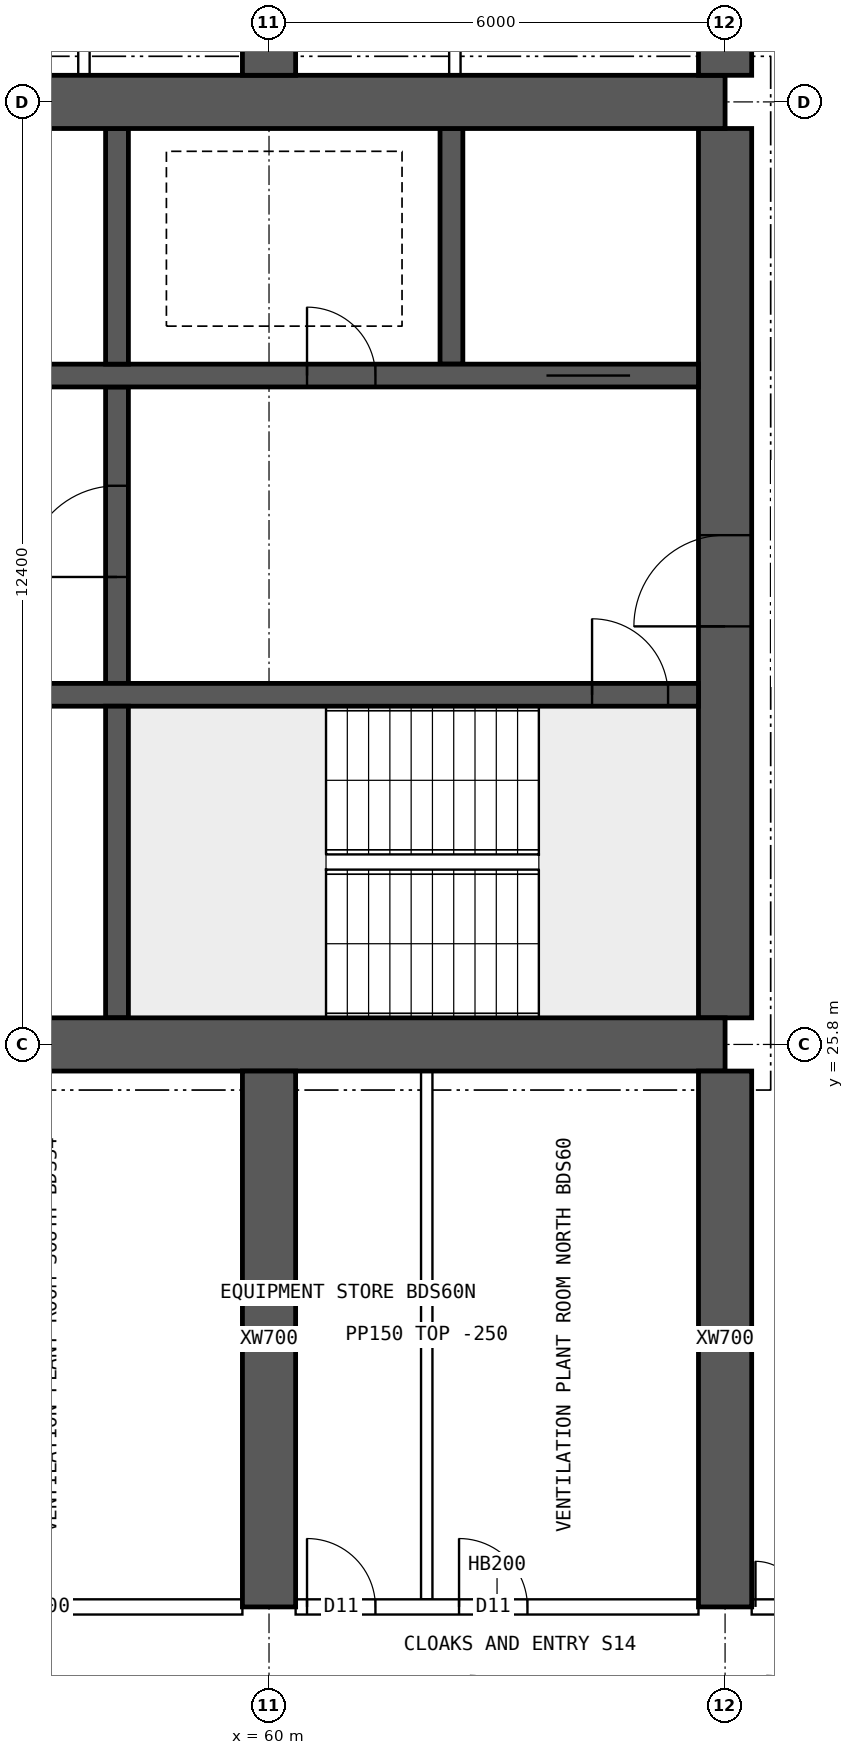
"""IFC4 building model, lengths in metres.
Left out: names, types, materials, properties, quantities, classifications, styles, units other than length and angle.
Written with IfcOpenShell. Run it as: python <this file> out.ifc"""

import sys

from ifc_helpers import new_model, si_unit, direction, frame, frame_2d, origin, place, context, subcontext, project, spatial, rectangle, extrude, element, fill, save


model = new_model("IFC4")
c1 = context("Model", 3, precision=1e-05, world=origin(), true_north=direction((0.0, 1.0)))
c2 = subcontext(c1, "Body", "Model", "MODEL_VIEW")
j1 = project(units=[si_unit("LENGTHUNIT", "METRE"), si_unit("PLANEANGLEUNIT", "RADIAN")], contexts=[c1])
p1 = place(None, origin())
s1 = spatial("IfcSite", under=j1, at=p1, CompositionType="ELEMENT")
p2 = place(p1, origin())
s2 = spatial("IfcBuilding", under=s1, at=p2, CompositionType="ELEMENT")
p3 = place(p2, frame((0.0, 0.0, 231.55)))
s3 = spatial("IfcBuildingStorey", under=s2, at=p3, CompositionType="ELEMENT", Elevation=231.55)
for number, where, z_axis, x_axis in (
    (1, (18.0, 25.8, 0.0), (0.0, 0.0, 1.0), (1.0, 0.0, 0.0)),
    (2, (18.0, 38.2, 0.0), (0.0, 0.0, 1.0), (1.0, 0.0, 0.0)),
):
    element("IfcWall", number, at=place(p3, frame(where, z_axis=z_axis, x_axis=x_axis)), inside=s3, PredefinedType="SHEAR", context=c2, shape_type="SweptSolid", body=[
        extrude(rectangle(XDim=48.0, YDim=0.7, at=frame_2d((24.0, 0.0))), origin(), (0.0, 0.0, 1.0), 3.75),
    ])
p4 = place(p3, frame((66.0, 26.15, 0.0), z_axis=(0.0, 0.0, 1.0), x_axis=(0.0, 1.0, 0.0)))
e3 = element("IfcWall", 3, at=p4, inside=s3, PredefinedType="SHEAR", context=c2, shape_type="SweptSolid", body=[
    extrude(rectangle(XDim=11.7, YDim=0.7, at=frame_2d((5.85, 0.0))), origin(), (0.0, 0.0, 1.0), 3.75),
])
p5 = place(p4, frame((5.15, 0.0, 0.0)))
e4 = element("IfcOpeningElement", 4, at=p5, cuts=e3, PredefinedType="OPENING", context=c2, shape_type="SweptSolid", body=[
    extrude(rectangle(XDim=1.2, YDim=2.1, at=frame_2d((0.6, 1.05))), frame((0.0, 0.36, 0.0), z_axis=(0.0, -1.0, 0.0), x_axis=(1.0, 0.0, 0.0)), (0.0, 0.0, 1.0), 0.72),
])
p6 = place(p3, frame((18.35, 30.4, 0.0), z_axis=(0.0, 0.0, 1.0), x_axis=(1.0, 0.0, 0.0)))
e5 = element("IfcWall", 5, at=p6, inside=s3, PredefinedType="SHEAR", context=c2, shape_type="SweptSolid", body=[
    extrude(rectangle(XDim=47.3, YDim=0.3, at=frame_2d((23.65, 0.0))), origin(), (0.0, 0.0, 1.0), 3.75),
])
p7 = place(p6, frame((0.4, 0.0, 0.0)))
e6 = element("IfcOpeningElement", 6, at=p7, cuts=e5, PredefinedType="OPENING", context=c2, shape_type="SweptSolid", body=[
    extrude(rectangle(XDim=1.0, YDim=2.1, at=frame_2d((0.5, 1.05))), frame((0.0, 0.16, 0.0), z_axis=(0.0, -1.0, 0.0), x_axis=(1.0, 0.0, 0.0)), (0.0, 0.0, 1.0), 0.32),
])
p8 = place(p6, frame((45.9, 0.0, 0.0)))
e7 = element("IfcOpeningElement", 7, at=p8, cuts=e5, PredefinedType="OPENING", context=c2, shape_type="SweptSolid", body=[
    extrude(rectangle(XDim=1.0, YDim=2.1, at=frame_2d((0.5, 1.05))), frame((0.0, 0.16, 0.0), z_axis=(0.0, -1.0, 0.0), x_axis=(1.0, 0.0, 0.0)), (0.0, 0.0, 1.0), 0.32),
])
p9 = place(p6, frame((8.4, 0.0, 0.0)))
e8 = element("IfcOpeningElement", 8, at=p9, cuts=e5, PredefinedType="OPENING", context=c2, shape_type="SweptSolid", body=[
    extrude(rectangle(XDim=1.1, YDim=2.1, at=frame_2d((0.55, 1.05))), frame((0.0, 0.16, 0.0), z_axis=(0.0, -1.0, 0.0), x_axis=(1.0, 0.0, 0.0)), (0.0, 0.0, 1.0), 0.32),
])
p10 = place(p6, frame((11.0, 0.0, 0.0)))
e9 = element("IfcOpeningElement", 9, at=p10, cuts=e5, PredefinedType="OPENING", context=c2, shape_type="SweptSolid", body=[
    extrude(rectangle(XDim=1.1, YDim=2.1, at=frame_2d((0.55, 1.05))), frame((0.0, 0.16, 0.0), z_axis=(0.0, -1.0, 0.0), x_axis=(1.0, 0.0, 0.0)), (0.0, 0.0, 1.0), 0.32),
])
p11 = place(p6, frame((13.6, 0.0, 0.0)))
e10 = element("IfcOpeningElement", 10, at=p11, cuts=e5, PredefinedType="OPENING", context=c2, shape_type="SweptSolid", body=[
    extrude(rectangle(XDim=1.1, YDim=2.1, at=frame_2d((0.55, 1.05))), frame((0.0, 0.16, 0.0), z_axis=(0.0, -1.0, 0.0), x_axis=(1.0, 0.0, 0.0)), (0.0, 0.0, 1.0), 0.32),
])
p12 = place(p6, frame((16.2, 0.0, 0.0)))
e11 = element("IfcOpeningElement", 11, at=p12, cuts=e5, PredefinedType="OPENING", context=c2, shape_type="SweptSolid", body=[
    extrude(rectangle(XDim=1.1, YDim=2.1, at=frame_2d((0.55, 1.05))), frame((0.0, 0.16, 0.0), z_axis=(0.0, -1.0, 0.0), x_axis=(1.0, 0.0, 0.0)), (0.0, 0.0, 1.0), 0.32),
])
p13 = place(p6, frame((18.975, 0.0, 0.0)))
e12 = element("IfcOpeningElement", 12, at=p13, cuts=e5, PredefinedType="OPENING", context=c2, shape_type="SweptSolid", body=[
    extrude(rectangle(XDim=0.9, YDim=2.1, at=frame_2d((0.45, 1.05))), frame((0.0, 0.16, 0.0), z_axis=(0.0, -1.0, 0.0), x_axis=(1.0, 0.0, 0.0)), (0.0, 0.0, 1.0), 0.32),
])
p14 = place(p6, frame((24.475, 0.0, 0.0)))
e13 = element("IfcOpeningElement", 13, at=p14, cuts=e5, PredefinedType="OPENING", context=c2, shape_type="SweptSolid", body=[
    extrude(rectangle(XDim=0.9, YDim=2.1, at=frame_2d((0.45, 1.05))), frame((0.0, 0.16, 0.0), z_axis=(0.0, -1.0, 0.0), x_axis=(1.0, 0.0, 0.0)), (0.0, 0.0, 1.0), 0.32),
])
p15 = place(p6, frame((30.267, 0.0, 0.0)))
e14 = element("IfcOpeningElement", 14, at=p15, cuts=e5, PredefinedType="OPENING", context=c2, shape_type="SweptSolid", body=[
    extrude(rectangle(XDim=1.1, YDim=2.1, at=frame_2d((0.55, 1.05))), frame((0.0, 0.16, 0.0), z_axis=(0.0, -1.0, 0.0), x_axis=(1.0, 0.0, 0.0)), (0.0, 0.0, 1.0), 0.32),
])
p16 = place(p6, frame((33.8, 0.0, 0.0)))
e15 = element("IfcOpeningElement", 15, at=p16, cuts=e5, PredefinedType="OPENING", context=c2, shape_type="SweptSolid", body=[
    extrude(rectangle(XDim=1.1, YDim=2.1, at=frame_2d((0.55, 1.05))), frame((0.0, 0.16, 0.0), z_axis=(0.0, -1.0, 0.0), x_axis=(1.0, 0.0, 0.0)), (0.0, 0.0, 1.0), 0.32),
])
p17 = place(p6, frame((37.333, 0.0, 0.0)))
e16 = element("IfcOpeningElement", 16, at=p17, cuts=e5, PredefinedType="OPENING", context=c2, shape_type="SweptSolid", body=[
    extrude(rectangle(XDim=1.1, YDim=2.1, at=frame_2d((0.55, 1.05))), frame((0.0, 0.16, 0.0), z_axis=(0.0, -1.0, 0.0), x_axis=(1.0, 0.0, 0.0)), (0.0, 0.0, 1.0), 0.32),
])
p18 = place(p3, frame((18.35, 34.6, 0.0), z_axis=(0.0, 0.0, 1.0), x_axis=(1.0, 0.0, 0.0)))
e17 = element("IfcWall", 17, at=p18, inside=s3, PredefinedType="SHEAR", context=c2, shape_type="SweptSolid", body=[
    extrude(rectangle(XDim=47.3, YDim=0.3, at=frame_2d((23.65, 0.0))), origin(), (0.0, 0.0, 1.0), 3.75),
])
p19 = place(p18, frame((0.9, 0.0, 0.0)))
e18 = element("IfcOpeningElement", 18, at=p19, cuts=e17, PredefinedType="OPENING", context=c2, shape_type="SweptSolid", body=[
    extrude(rectangle(XDim=1.1, YDim=2.1, at=frame_2d((0.55, 1.05))), frame((0.0, 0.16, 0.0), z_axis=(0.0, -1.0, 0.0), x_axis=(1.0, 0.0, 0.0)), (0.0, 0.0, 1.0), 0.32),
])
p20 = place(p18, frame((45.3, 0.0, 0.0)))
e19 = element("IfcOpeningElement", 19, at=p20, cuts=e17, PredefinedType="OPENING", context=c2, shape_type="SweptSolid", body=[
    extrude(rectangle(XDim=1.1, YDim=2.1, at=frame_2d((0.55, 1.05))), frame((0.0, 0.16, 0.0), z_axis=(0.0, -1.0, 0.0), x_axis=(1.0, 0.0, 0.0)), (0.0, 0.0, 1.0), 0.32),
])
p21 = place(p18, frame((4.25, 0.0, 0.0)))
e20 = element("IfcOpeningElement", 20, at=p21, cuts=e17, PredefinedType="OPENING", context=c2, shape_type="SweptSolid", body=[
    extrude(rectangle(XDim=0.9, YDim=2.1, at=frame_2d((0.45, 1.05))), frame((0.0, 0.16, 0.0), z_axis=(0.0, -1.0, 0.0), x_axis=(1.0, 0.0, 0.0)), (0.0, 0.0, 1.0), 0.32),
])
p22 = place(p18, frame((42.15, 0.0, 0.0)))
e21 = element("IfcOpeningElement", 21, at=p22, cuts=e17, PredefinedType="OPENING", context=c2, shape_type="SweptSolid", body=[
    extrude(rectangle(XDim=0.9, YDim=2.1, at=frame_2d((0.45, 1.05))), frame((0.0, 0.16, 0.0), z_axis=(0.0, -1.0, 0.0), x_axis=(1.0, 0.0, 0.0)), (0.0, 0.0, 1.0), 0.32),
])
p23 = place(p18, frame((9.025, 0.0, 0.0)))
e22 = element("IfcOpeningElement", 22, at=p23, cuts=e17, PredefinedType="OPENING", context=c2, shape_type="SweptSolid", body=[
    extrude(rectangle(XDim=0.9, YDim=2.1, at=frame_2d((0.45, 1.05))), frame((0.0, 0.16, 0.0), z_axis=(0.0, -1.0, 0.0), x_axis=(1.0, 0.0, 0.0)), (0.0, 0.0, 1.0), 0.32),
])
p24 = place(p18, frame((12.999, 0.0, 0.0)))
e23 = element("IfcOpeningElement", 23, at=p24, cuts=e17, PredefinedType="OPENING", context=c2, shape_type="SweptSolid", body=[
    extrude(rectangle(XDim=0.9, YDim=2.1, at=frame_2d((0.45, 1.05))), frame((0.0, 0.16, 0.0), z_axis=(0.0, -1.0, 0.0), x_axis=(1.0, 0.0, 0.0)), (0.0, 0.0, 1.0), 0.32),
])
p25 = place(p18, frame((16.646, 0.0, 0.0)))
e24 = element("IfcOpeningElement", 24, at=p25, cuts=e17, PredefinedType="OPENING", context=c2, shape_type="SweptSolid", body=[
    extrude(rectangle(XDim=0.9, YDim=2.1, at=frame_2d((0.45, 1.05))), frame((0.0, 0.16, 0.0), z_axis=(0.0, -1.0, 0.0), x_axis=(1.0, 0.0, 0.0)), (0.0, 0.0, 1.0), 0.32),
])
p26 = place(p18, frame((20.405, 0.0, 0.0)))
e25 = element("IfcOpeningElement", 25, at=p26, cuts=e17, PredefinedType="OPENING", context=c2, shape_type="SweptSolid", body=[
    extrude(rectangle(XDim=0.9, YDim=2.1, at=frame_2d((0.45, 1.05))), frame((0.0, 0.16, 0.0), z_axis=(0.0, -1.0, 0.0), x_axis=(1.0, 0.0, 0.0)), (0.0, 0.0, 1.0), 0.32),
])
p27 = place(p18, frame((24.811, 0.0, 0.0)))
e26 = element("IfcOpeningElement", 26, at=p27, cuts=e17, PredefinedType="OPENING", context=c2, shape_type="SweptSolid", body=[
    extrude(rectangle(XDim=0.9, YDim=2.1, at=frame_2d((0.45, 1.05))), frame((0.0, 0.16, 0.0), z_axis=(0.0, -1.0, 0.0), x_axis=(1.0, 0.0, 0.0)), (0.0, 0.0, 1.0), 0.32),
])
p28 = place(p18, frame((27.608, 0.0, 0.0)))
e27 = element("IfcOpeningElement", 27, at=p28, cuts=e17, PredefinedType="OPENING", context=c2, shape_type="SweptSolid", body=[
    extrude(rectangle(XDim=0.9, YDim=2.1, at=frame_2d((0.45, 1.05))), frame((0.0, 0.16, 0.0), z_axis=(0.0, -1.0, 0.0), x_axis=(1.0, 0.0, 0.0)), (0.0, 0.0, 1.0), 0.32),
])
p29 = place(p18, frame((33.729, 0.0, 0.0)))
e28 = element("IfcOpeningElement", 28, at=p29, cuts=e17, PredefinedType="OPENING", context=c2, shape_type="SweptSolid", body=[
    extrude(rectangle(XDim=0.9, YDim=2.1, at=frame_2d((0.45, 1.05))), frame((0.0, 0.16, 0.0), z_axis=(0.0, -1.0, 0.0), x_axis=(1.0, 0.0, 0.0)), (0.0, 0.0, 1.0), 0.32),
])
p30 = place(p3, frame((58.0, 26.15, 0.0), z_axis=(0.0, 0.0, 1.0), x_axis=(0.0, 1.0, 0.0)))
e29 = element("IfcWall", 29, at=p30, inside=s3, PredefinedType="SHEAR", context=c2, shape_type="SweptSolid", body=[
    extrude(rectangle(XDim=4.1, YDim=0.3, at=frame_2d((2.05, 0.0))), origin(), (0.0, 0.0, 1.0), 3.75),
])
p31 = place(p3, frame((58.0, 30.55, 0.0), z_axis=(0.0, 0.0, 1.0), x_axis=(0.0, 1.0, 0.0)))
e30 = element("IfcWall", 30, at=p31, inside=s3, PredefinedType="SHEAR", context=c2, shape_type="SweptSolid", body=[
    extrude(rectangle(XDim=3.9, YDim=0.3, at=frame_2d((1.95, 0.0))), origin(), (0.0, 0.0, 1.0), 3.75),
])
p32 = place(p31, frame((1.4, 0.0, 0.0)))
e31 = element("IfcOpeningElement", 31, at=p32, cuts=e30, PredefinedType="OPENING", context=c2, shape_type="SweptSolid", body=[
    extrude(rectangle(XDim=1.2, YDim=2.1, at=frame_2d((0.6, 1.05))), frame((0.0, 0.16, 0.0), z_axis=(0.0, -1.0, 0.0), x_axis=(1.0, 0.0, 0.0)), (0.0, 0.0, 1.0), 0.32),
])
for number, where, z_axis, x_axis in (
    (32, (62.4, 34.75, 0.0), (0.0, 0.0, 1.0), (0.0, 1.0, 0.0)),
    (33, (58.0, 34.75, 0.0), (0.0, 0.0, 1.0), (0.0, 1.0, 0.0)),
):
    element("IfcWall", number, at=place(p3, frame(where, z_axis=z_axis, x_axis=x_axis)), inside=s3, PredefinedType="SHEAR", context=c2, shape_type="SweptSolid", body=[
        extrude(rectangle(XDim=3.1, YDim=0.3, at=frame_2d((1.55, 0.0))), origin(), (0.0, 0.0, 1.0), 3.75),
    ])
for number, where, z_axis, x_axis in (
    (34, (60.0, 18.4, 0.0), (0.0, 0.0, 1.0), (0.0, 1.0, 0.0)),
    (35, (60.0, 38.55, 0.0), (0.0, 0.0, 1.0), (0.0, 1.0, 0.0)),
    (36, (66.0, 18.4, 0.0), (0.0, 0.0, 1.0), (0.0, 1.0, 0.0)),
    (37, (66.0, 38.55, 0.0), (0.0, 0.0, 1.0), (0.0, 1.0, 0.0)),
):
    element("IfcWall", number, at=place(p3, frame(where, z_axis=z_axis, x_axis=x_axis)), inside=s3, PredefinedType="SHEAR", context=c2, shape_type="SweptSolid", body=[
        extrude(rectangle(XDim=7.05, YDim=0.7, at=frame_2d((3.525, 0.0))), origin(), (0.0, 0.0, 1.0), 3.75),
    ])
p33 = place(p3, frame((54.35, 18.4, 0.0), z_axis=(0.0, 0.0, 1.0), x_axis=(1.0, 0.0, 0.0)))
e38 = element("IfcWall", 38, at=p33, inside=s3, PredefinedType="SOLIDWALL", context=c2, shape_type="SweptSolid", body=[
    extrude(rectangle(XDim=5.3, YDim=0.2, at=frame_2d((2.65, 0.0))), origin(), (0.0, 0.0, 1.0), 3.5),
])
p34 = place(p33, frame((0.8, 0.0, 0.0)))
e39 = element("IfcOpeningElement", 39, at=p34, cuts=e38, PredefinedType="OPENING", context=c2, shape_type="SweptSolid", body=[
    extrude(rectangle(XDim=1.0, YDim=2.1, at=frame_2d((0.5, 1.05))), frame((0.0, 0.11, 0.0), z_axis=(0.0, -1.0, 0.0), x_axis=(1.0, 0.0, 0.0)), (0.0, 0.0, 1.0), 0.22),
])
p35 = place(p3, frame((60.35, 18.4, 0.0), z_axis=(0.0, 0.0, 1.0), x_axis=(1.0, 0.0, 0.0)))
e40 = element("IfcWall", 40, at=p35, inside=s3, PredefinedType="SOLIDWALL", context=c2, shape_type="SweptSolid", body=[
    extrude(rectangle(XDim=5.3, YDim=0.2, at=frame_2d((2.65, 0.0))), origin(), (0.0, 0.0, 1.0), 3.5),
])
p36 = place(p35, frame((0.15, 0.0, 0.0)))
e41 = element("IfcOpeningElement", 41, at=p36, cuts=e40, PredefinedType="OPENING", context=c2, shape_type="SweptSolid", body=[
    extrude(rectangle(XDim=0.9, YDim=2.1, at=frame_2d((0.45, 1.05))), frame((0.0, 0.11, 0.0), z_axis=(0.0, -1.0, 0.0), x_axis=(1.0, 0.0, 0.0)), (0.0, 0.0, 1.0), 0.22),
])
p37 = place(p35, frame((2.15, 0.0, 0.0)))
e42 = element("IfcOpeningElement", 42, at=p37, cuts=e40, PredefinedType="OPENING", context=c2, shape_type="SweptSolid", body=[
    extrude(rectangle(XDim=0.9, YDim=2.1, at=frame_2d((0.45, 1.05))), frame((0.0, 0.11, 0.0), z_axis=(0.0, -1.0, 0.0), x_axis=(1.0, 0.0, 0.0)), (0.0, 0.0, 1.0), 0.22),
])
p38 = place(p3, frame((66.35, 18.4, 0.0), z_axis=(0.0, 0.0, 1.0), x_axis=(1.0, 0.0, 0.0)))
e43 = element("IfcWall", 43, at=p38, inside=s3, PredefinedType="SOLIDWALL", context=c2, shape_type="SweptSolid", body=[
    extrude(rectangle(XDim=2.05, YDim=0.2, at=frame_2d((1.025, 0.0))), origin(), (0.0, 0.0, 1.0), 3.5),
])
p39 = place(p38, frame((0.05, 0.0, 0.0)))
e44 = element("IfcOpeningElement", 44, at=p39, cuts=e43, PredefinedType="OPENING", context=c2, shape_type="SweptSolid", body=[
    extrude(rectangle(XDim=1.2, YDim=2.1, at=frame_2d((0.6, 1.05))), frame((0.0, 0.11, 0.0), z_axis=(0.0, -1.0, 0.0), x_axis=(1.0, 0.0, 0.0)), (0.0, 0.0, 1.0), 0.22),
])
for number, where, z_axis, x_axis in (
    (45, (62.075, 18.5, 0.0), (0.0, 0.0, 1.0), (0.0, 1.0, 0.0)),
    (46, (57.565, 38.55, 0.0), (0.0, 0.0, 1.0), (0.0, 1.0, 0.0)),
    (47, (62.445, 38.55, 0.0), (0.0, 0.0, 1.0), (0.0, 1.0, 0.0)),
):
    element("IfcWall", number, at=place(p3, frame(where, z_axis=z_axis, x_axis=x_axis)), inside=s3, PredefinedType="PARTITIONING", context=c2, shape_type="SweptSolid", body=[
        extrude(rectangle(XDim=6.95, YDim=0.15, at=frame_2d((3.475, 0.0))), origin(), (0.0, 0.0, 1.0), 3.5),
    ])
p40 = place(p5, origin())
e48 = element("IfcDoor", 48, at=p40, inside=s3, OperationType="SINGLE_SWING_LEFT", PredefinedType="DOOR", context=c2, shape_type="SweptSolid", body=[
    extrude(rectangle(XDim=1.2, YDim=2.1, at=frame_2d((0.6, 1.05))), frame((0.0, 0.025, 0.0), z_axis=(0.0, -1.0, 0.0), x_axis=(1.0, 0.0, 0.0)), (0.0, 0.0, 1.0), 0.05),
])
fill(e4, e48)
p41 = place(p8, origin())
e49 = element("IfcDoor", 49, at=p41, inside=s3, OperationType="SINGLE_SWING_LEFT", PredefinedType="DOOR", context=c2, shape_type="SweptSolid", body=[
    extrude(rectangle(XDim=1.0, YDim=2.1, at=frame_2d((0.5, 1.05))), frame((0.0, 0.025, 0.0), z_axis=(0.0, -1.0, 0.0), x_axis=(1.0, 0.0, 0.0)), (0.0, 0.0, 1.0), 0.05),
])
fill(e7, e49)
p42 = place(p20, origin())
e50 = element("IfcDoor", 50, at=p42, inside=s3, OperationType="DOUBLE_DOOR_SLIDING", PredefinedType="DOOR", context=c2, shape_type="SweptSolid", body=[
    extrude(rectangle(XDim=1.1, YDim=2.1, at=frame_2d((0.55, 1.05))), frame((0.0, 0.025, 0.0), z_axis=(0.0, -1.0, 0.0), x_axis=(1.0, 0.0, 0.0)), (0.0, 0.0, 1.0), 0.05),
])
fill(e19, e50)
p43 = place(p22, origin())
e51 = element("IfcDoor", 51, at=p43, inside=s3, OperationType="SINGLE_SWING_LEFT", PredefinedType="DOOR", context=c2, shape_type="SweptSolid", body=[
    extrude(rectangle(XDim=0.9, YDim=2.1, at=frame_2d((0.45, 1.05))), frame((0.0, 0.025, 0.0), z_axis=(0.0, -1.0, 0.0), x_axis=(1.0, 0.0, 0.0)), (0.0, 0.0, 1.0), 0.05),
])
fill(e21, e51)
p44 = place(p32, origin())
e52 = element("IfcDoor", 52, at=p44, inside=s3, OperationType="SINGLE_SWING_LEFT", PredefinedType="DOOR", context=c2, shape_type="SweptSolid", body=[
    extrude(rectangle(XDim=1.2, YDim=2.1, at=frame_2d((0.6, 1.05))), frame((0.0, 0.025, 0.0), z_axis=(0.0, -1.0, 0.0), x_axis=(1.0, 0.0, 0.0)), (0.0, 0.0, 1.0), 0.05),
])
fill(e31, e52)
p45 = place(p39, origin())
e53 = element("IfcDoor", 53, at=p45, inside=s3, OperationType="DOUBLE_DOOR_SINGLE_SWING", PredefinedType="DOOR", context=c2, shape_type="SweptSolid", body=[
    extrude(rectangle(XDim=1.2, YDim=2.1, at=frame_2d((0.6, 1.05))), frame((0.0, 0.025, 0.0), z_axis=(0.0, -1.0, 0.0), x_axis=(1.0, 0.0, 0.0)), (0.0, 0.0, 1.0), 0.05),
])
fill(e44, e53)
p46 = place(p36, origin())
e54 = element("IfcDoor", 54, at=p46, inside=s3, OperationType="SINGLE_SWING_LEFT", PredefinedType="DOOR", context=c2, shape_type="SweptSolid", body=[
    extrude(rectangle(XDim=0.9, YDim=2.1, at=frame_2d((0.45, 1.05))), frame((0.0, 0.025, 0.0), z_axis=(0.0, -1.0, 0.0), x_axis=(1.0, 0.0, 0.0)), (0.0, 0.0, 1.0), 0.05),
])
fill(e41, e54)
p47 = place(p37, origin())
e55 = element("IfcDoor", 55, at=p47, inside=s3, OperationType="SINGLE_SWING_LEFT", PredefinedType="DOOR", context=c2, shape_type="SweptSolid", body=[
    extrude(rectangle(XDim=0.9, YDim=2.1, at=frame_2d((0.45, 1.05))), frame((0.0, 0.025, 0.0), z_axis=(0.0, -1.0, 0.0), x_axis=(1.0, 0.0, 0.0)), (0.0, 0.0, 1.0), 0.05),
])
fill(e42, e55)
save(model, sys.argv[1])
